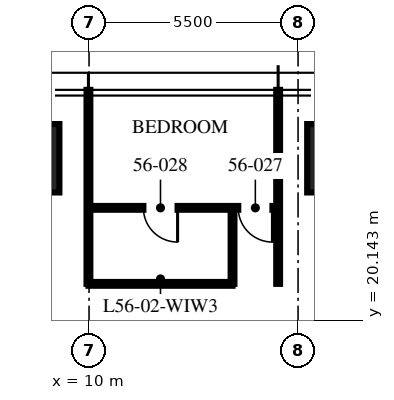
"""IFC4 building model, lengths in metres.
Left out: names, types, materials, properties, quantities, classifications, styles, units other than length and angle.
Written with IfcOpenShell. Run it as: python <this file> out.ifc"""

import sys

from ifc_helpers import new_model, si_unit, direction, frame, frame_2d, origin, origin_2d, place, context, subcontext, project, spatial, rectangle, extrude, element, fill, save


model = new_model("IFC4")
c1 = context("Model", 3, precision=1e-05, world=origin(), true_north=direction((0.0, 1.0)))
c2 = subcontext(c1, "Body", "Model", "MODEL_VIEW")
j1 = project(units=[si_unit("LENGTHUNIT", "METRE"), si_unit("PLANEANGLEUNIT", "RADIAN")], contexts=[c1])
p1 = place(None, origin())
s1 = spatial("IfcSite", under=j1, at=p1, CompositionType="ELEMENT")
p2 = place(p1, origin())
s2 = spatial("IfcBuilding", under=s1, at=p2, CompositionType="ELEMENT")
p3 = place(p2, frame((0.0, 0.0, 225.75)))
s3 = spatial("IfcBuildingStorey", under=s2, at=p3, CompositionType="ELEMENT", Elevation=225.75)
for number, where, z_axis, x_axis in (
    (1, (8.32, 24.4, 0.0), (0.0, 0.0, 1.0), (1.0, 0.0, 0.0)),
    (2, (16.64, 24.4, 0.0), (0.0, 0.0, 1.0), (1.0, 0.0, 0.0)),
):
    element("IfcColumn", number, at=place(p3, frame(where, z_axis=z_axis, x_axis=x_axis)), inside=s3, PredefinedType="COLUMN", context=c2, shape_type="SweptSolid", body=[
        extrude(rectangle(XDim=1.8, YDim=1.8, at=origin_2d()), origin(), (0.0, 0.0, 1.0), 3.75),
    ])
for number, where, z_axis, x_axis in (
    (3, (14.976, 21.095, 0.0), (0.0, 0.0, 1.0), (0.0, 1.0, 0.0)),
    (4, (9.984, 21.095, 0.0), (0.0, 0.0, 1.0), (0.0, 1.0, 0.0)),
):
    element("IfcWall", number, at=place(p3, frame(where, z_axis=z_axis, x_axis=x_axis)), inside=s3, PredefinedType="PARTITIONING", context=c2, shape_type="SweptSolid", body=[
        extrude(rectangle(XDim=5.105, YDim=0.1, at=frame_2d((2.552, 0.0))), origin(), (0.0, 0.0, 1.0), 2.91),
    ])
p4 = place(p3, frame((14.976, 23.095, 0.0), z_axis=(0.0, 0.0, 1.0), x_axis=(-1.0, 0.0, 0.0)))
e5 = element("IfcWall", 5, at=p4, inside=s3, PredefinedType="PARTITIONING", context=c2, shape_type="SweptSolid", body=[
    extrude(rectangle(XDim=4.992, YDim=0.1, at=frame_2d((2.496, 0.0))), origin(), (0.0, 0.0, 1.0), 2.81),
])
p5 = place(p4, frame((0.15, 0.0, 0.0)))
e6 = element("IfcOpeningElement", 6, at=p5, cuts=e5, PredefinedType="OPENING", context=c2, shape_type="SweptSolid", body=[
    extrude(rectangle(XDim=0.9, YDim=2.1, at=frame_2d((0.45, 1.05))), frame((0.0, 0.06, 0.0), z_axis=(0.0, -1.0, 0.0), x_axis=(1.0, 0.0, 0.0)), (0.0, 0.0, 1.0), 0.12),
])
p6 = place(p4, frame((2.646, 0.0, 0.0)))
e7 = element("IfcOpeningElement", 7, at=p6, cuts=e5, PredefinedType="OPENING", context=c2, shape_type="SweptSolid", body=[
    extrude(rectangle(XDim=0.9, YDim=2.1, at=frame_2d((0.45, 1.05))), frame((0.0, 0.06, 0.0), z_axis=(0.0, -1.0, 0.0), x_axis=(1.0, 0.0, 0.0)), (0.0, 0.0, 1.0), 0.12),
])
p7 = place(p3, frame((13.776, 21.095, 0.0), z_axis=(0.0, 0.0, 1.0), x_axis=(0.0, 1.0, 0.0)))
e8 = element("IfcWall", 8, at=p7, inside=s3, PredefinedType="PARTITIONING", context=c2, shape_type="SweptSolid", body=[
    extrude(rectangle(XDim=2.0, YDim=0.1, at=frame_2d((1.0, 0.0))), origin(), (0.0, 0.0, 1.0), 3.5),
])
p8 = place(p3, frame((13.776, 21.095, 0.0), z_axis=(0.0, 0.0, 1.0), x_axis=(-1.0, 0.0, 0.0)))
e9 = element("IfcWall", 9, at=p8, inside=s3, PredefinedType="PARTITIONING", context=c2, shape_type="SweptSolid", body=[
    extrude(rectangle(XDim=3.792, YDim=0.1, at=frame_2d((1.896, 0.0))), origin(), (0.0, 0.0, 1.0), 2.81),
])
p9 = place(p5, origin())
e10 = element("IfcDoor", 10, at=p9, inside=s3, OperationType="SINGLE_SWING_LEFT", PredefinedType="DOOR", context=c2, shape_type="SweptSolid", body=[
    extrude(rectangle(XDim=0.9, YDim=2.1, at=frame_2d((0.45, 1.05))), frame((0.0, 0.025, 0.0), z_axis=(0.0, -1.0, 0.0), x_axis=(1.0, 0.0, 0.0)), (0.0, 0.0, 1.0), 0.05),
])
fill(e6, e10)
p10 = place(p6, origin())
e11 = element("IfcDoor", 11, at=p10, inside=s3, OperationType="SINGLE_SWING_LEFT", PredefinedType="DOOR", context=c2, shape_type="SweptSolid", body=[
    extrude(rectangle(XDim=0.9, YDim=2.1, at=frame_2d((0.45, 1.05))), frame((0.0, 0.025, 0.0), z_axis=(0.0, -1.0, 0.0), x_axis=(1.0, 0.0, 0.0)), (0.0, 0.0, 1.0), 0.05),
])
fill(e7, e11)
save(model, sys.argv[1])
